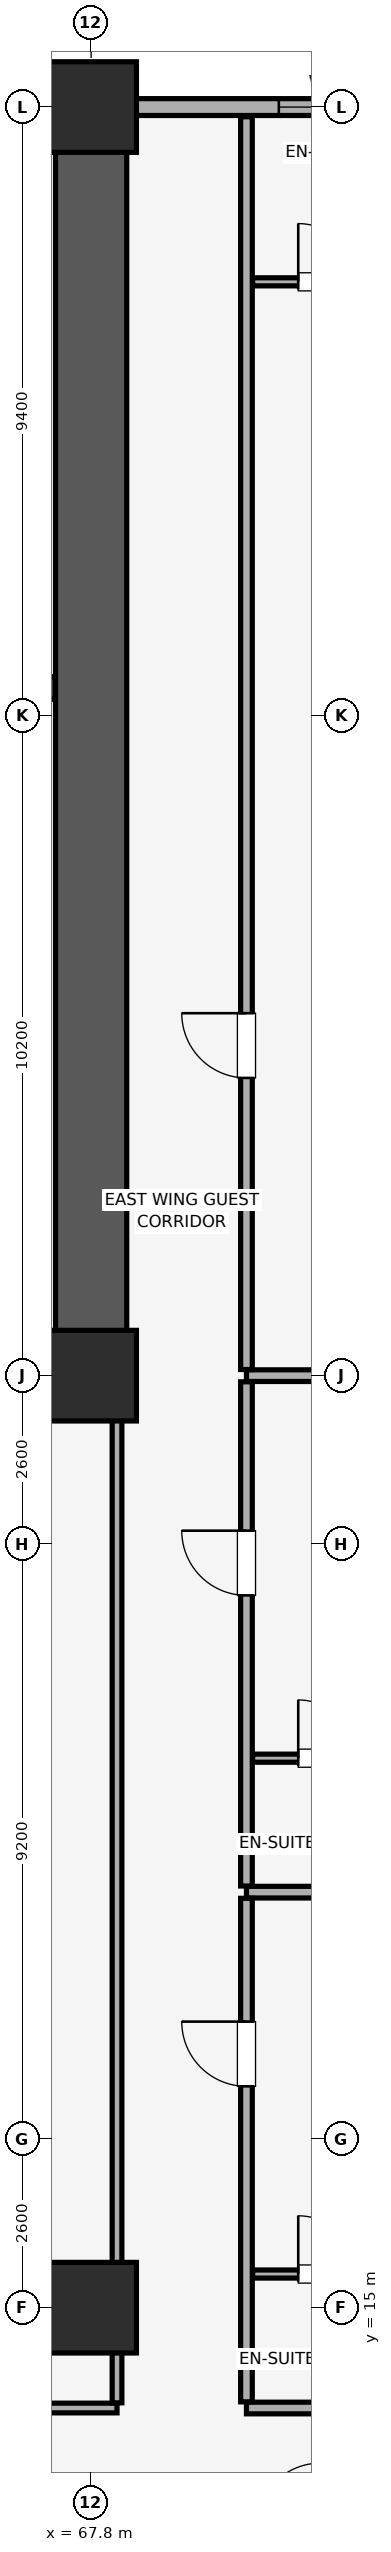
"""IFC4 building model, lengths in metres.
Left out: names, types, materials, properties, quantities, classifications, styles, units other than length and angle.
Written with IfcOpenShell. Run it as: python <this file> out.ifc"""

import sys

from ifc_helpers import new_model, si_unit, direction, frame, frame_2d, origin, origin_2d, place, context, subcontext, project, spatial, rectangle, extrude, element, fill, save


model = new_model("IFC4")
c1 = context("Model", 3, precision=1e-05, world=origin(), true_north=direction((0.0, 1.0)))
c2 = subcontext(c1, "Body", "Model", "MODEL_VIEW")
j1 = project(units=[si_unit("LENGTHUNIT", "METRE"), si_unit("PLANEANGLEUNIT", "RADIAN")], contexts=[c1])
p1 = place(None, origin())
s1 = spatial("IfcSite", under=j1, at=p1, CompositionType="ELEMENT")
p2 = place(p1, origin())
s2 = spatial("IfcBuilding", under=s1, at=p2, CompositionType="ELEMENT")
p3 = place(p2, frame((0.0, 0.0, 57.65)))
s3 = spatial("IfcBuildingStorey", under=s2, at=p3, CompositionType="ELEMENT", Elevation=57.65)
for number, where, z_axis, x_axis in (
    (1, (67.8, 15.0, 0.0), (0.0, 0.0, 1.0), (1.0, 0.0, 0.0)),
    (2, (67.8, 29.4, 0.0), (0.0, 0.0, 1.0), (1.0, 0.0, 0.0)),
    (3, (67.8, 49.0, 0.0), (0.0, 0.0, 1.0), (1.0, 0.0, 0.0)),
):
    element("IfcColumn", number, at=place(p3, frame(where, z_axis=z_axis, x_axis=x_axis)), inside=s3, PredefinedType="COLUMN", context=c2, shape_type="SweptSolid", body=[
        extrude(rectangle(XDim=1.4, YDim=1.4, at=origin_2d()), origin(), (0.0, 0.0, 1.0), 3.51),
    ])
p4 = place(p3, frame((79.8, 49.0, 0.0), z_axis=(0.0, 0.0, 1.0), x_axis=(-1.0, 0.0, 0.0)))
e4 = element("IfcWall", 4, at=p4, inside=s3, PredefinedType="SOLIDWALL", context=c2, shape_type="SweptSolid", body=[
    extrude(rectangle(XDim=75.6, YDim=0.26, at=frame_2d((37.8, 0.0))), origin(), (0.0, 0.0, 1.0), 2.56),
])
p5 = place(p4, frame((72.565, 0.0, 0.85)))
e5 = element("IfcOpeningElement", 5, at=p5, cuts=e4, PredefinedType="OPENING", context=c2, shape_type="SweptSolid", body=[
    extrude(rectangle(XDim=1.5, YDim=1.4, at=frame_2d((0.75, 0.7))), frame((0.0, 0.14, 0.0), z_axis=(0.0, -1.0, 0.0), x_axis=(1.0, 0.0, 0.0)), (0.0, 0.0, 1.0), 0.28),
])
p6 = place(p4, frame((67.45, 0.0, 0.85)))
e6 = element("IfcOpeningElement", 6, at=p6, cuts=e4, PredefinedType="OPENING", context=c2, shape_type="SweptSolid", body=[
    extrude(rectangle(XDim=1.5, YDim=1.4, at=frame_2d((0.75, 0.7))), frame((0.0, 0.14, 0.0), z_axis=(0.0, -1.0, 0.0), x_axis=(1.0, 0.0, 0.0)), (0.0, 0.0, 1.0), 0.28),
])
p7 = place(p4, frame((7.6, 0.0, 0.85)))
e7 = element("IfcOpeningElement", 7, at=p7, cuts=e4, PredefinedType="OPENING", context=c2, shape_type="SweptSolid", body=[
    extrude(rectangle(XDim=1.5, YDim=1.4, at=frame_2d((0.75, 0.7))), frame((0.0, 0.14, 0.0), z_axis=(0.0, -1.0, 0.0), x_axis=(1.0, 0.0, 0.0)), (0.0, 0.0, 1.0), 0.28),
])
p8 = place(p4, frame((1.535, 0.0, 0.85)))
e8 = element("IfcOpeningElement", 8, at=p8, cuts=e4, PredefinedType="OPENING", context=c2, shape_type="SweptSolid", body=[
    extrude(rectangle(XDim=1.5, YDim=1.4, at=frame_2d((0.75, 0.7))), frame((0.0, 0.14, 0.0), z_axis=(0.0, -1.0, 0.0), x_axis=(1.0, 0.0, 0.0)), (0.0, 0.0, 1.0), 0.28),
])
p9 = place(p4, frame((52.265, 0.0, 0.9)))
e9 = element("IfcOpeningElement", 9, at=p9, cuts=e4, PredefinedType="OPENING", context=c2, shape_type="SweptSolid", body=[
    extrude(rectangle(XDim=1.5, YDim=1.4, at=frame_2d((0.75, 0.7))), frame((0.0, 0.14, 0.0), z_axis=(0.0, -1.0, 0.0), x_axis=(1.0, 0.0, 0.0)), (0.0, 0.0, 1.0), 0.28),
])
p10 = place(p4, frame((45.5, 0.0, 0.9)))
e10 = element("IfcOpeningElement", 10, at=p10, cuts=e4, PredefinedType="OPENING", context=c2, shape_type="SweptSolid", body=[
    extrude(rectangle(XDim=1.5, YDim=1.4, at=frame_2d((0.75, 0.7))), frame((0.0, 0.14, 0.0), z_axis=(0.0, -1.0, 0.0), x_axis=(1.0, 0.0, 0.0)), (0.0, 0.0, 1.0), 0.28),
])
p11 = place(p4, frame((31.05, 0.0, 0.9)))
e11 = element("IfcOpeningElement", 11, at=p11, cuts=e4, PredefinedType="OPENING", context=c2, shape_type="SweptSolid", body=[
    extrude(rectangle(XDim=1.5, YDim=1.4, at=frame_2d((0.75, 0.7))), frame((0.0, 0.14, 0.0), z_axis=(0.0, -1.0, 0.0), x_axis=(1.0, 0.0, 0.0)), (0.0, 0.0, 1.0), 0.28),
])
p12 = place(p4, frame((27.85, 0.0, 0.9)))
e12 = element("IfcOpeningElement", 12, at=p12, cuts=e4, PredefinedType="OPENING", context=c2, shape_type="SweptSolid", body=[
    extrude(rectangle(XDim=1.5, YDim=1.4, at=frame_2d((0.75, 0.7))), frame((0.0, 0.14, 0.0), z_axis=(0.0, -1.0, 0.0), x_axis=(1.0, 0.0, 0.0)), (0.0, 0.0, 1.0), 0.28),
])
p13 = place(p4, frame((23.485, 0.0, 0.9)))
e13 = element("IfcOpeningElement", 13, at=p13, cuts=e4, PredefinedType="OPENING", context=c2, shape_type="SweptSolid", body=[
    extrude(rectangle(XDim=1.5, YDim=1.4, at=frame_2d((0.75, 0.7))), frame((0.0, 0.14, 0.0), z_axis=(0.0, -1.0, 0.0), x_axis=(1.0, 0.0, 0.0)), (0.0, 0.0, 1.0), 0.28),
])
p14 = place(p3, frame((67.8, 29.4, 0.0), z_axis=(0.0, 0.0, 1.0), x_axis=(0.0, 1.0, 0.0)))
e14 = element("IfcWall", 14, at=p14, inside=s3, PredefinedType="SHEAR", context=c2, shape_type="SweptSolid", body=[
    extrude(rectangle(XDim=19.2, YDim=1.1, at=frame_2d((9.6, 0.0))), origin(), (0.0, 0.0, 1.0), 3.51),
])
p15 = place(p3, frame((60.4, 29.4, 0.0), z_axis=(0.0, 0.0, 1.0), x_axis=(1.0, 0.0, 0.0)))
e15 = element("IfcWall", 15, at=p15, inside=s3, PredefinedType="SHEAR", context=c2, shape_type="SweptSolid", body=[
    extrude(rectangle(XDim=6.845, YDim=1.1, at=frame_2d((3.423, 0.0))), origin(), (0.0, 0.0, 1.0), 3.51),
])
p16 = place(p3, frame((63.145, 40.025, 0.0), z_axis=(0.0, 0.0, 1.0), x_axis=(1.0, 0.0, 0.0)))
e16 = element("IfcWall", 16, at=p16, inside=s3, PredefinedType="SHEAR", context=c2, shape_type="SweptSolid", body=[
    extrude(rectangle(XDim=4.1, YDim=0.35, at=frame_2d((2.05, 0.0))), origin(), (0.0, 0.0, 1.0), 3.51),
])
p17 = place(p16, frame((1.24, 0.0, 0.0)))
e17 = element("IfcOpeningElement", 17, at=p17, cuts=e16, PredefinedType="OPENING", context=c2, shape_type="SweptSolid", body=[
    extrude(rectangle(XDim=1.15, YDim=2.15, at=frame_2d((0.575, 1.075))), frame((0.0, 0.185, 0.0), z_axis=(0.0, -1.0, 0.0), x_axis=(1.0, 0.0, 0.0)), (0.0, 0.0, 1.0), 0.37),
])
p18 = place(p3, frame((57.88, 13.45, 0.0), z_axis=(0.0, 0.0, 1.0), x_axis=(1.0, 0.0, 0.0)))
e18 = element("IfcWall", 18, at=p18, inside=s3, PredefinedType="PARTITIONING", context=c2, shape_type="SweptSolid", body=[
    extrude(rectangle(XDim=10.32, YDim=0.15, at=frame_2d((5.16, 0.0))), origin(), (0.0, 0.0, 1.0), 3.51),
])
p19 = place(p18, frame((4.62, 0.0, 0.0)))
e19 = element("IfcOpeningElement", 19, at=p19, cuts=e18, PredefinedType="OPENING", context=c2, shape_type="SweptSolid", body=[
    extrude(rectangle(XDim=1.0, YDim=2.15, at=frame_2d((0.5, 1.075))), frame((0.0, 0.085, 0.0), z_axis=(0.0, -1.0, 0.0), x_axis=(1.0, 0.0, 0.0)), (0.0, 0.0, 1.0), 0.17),
])
p20 = place(p3, frame((68.2, 13.53, 0.0), z_axis=(0.0, 0.0, 1.0), x_axis=(0.0, 1.0, 0.0)))
e20 = element("IfcWall", 20, at=p20, inside=s3, PredefinedType="PARTITIONING", context=c2, shape_type="SweptSolid", body=[
    extrude(rectangle(XDim=15.86, YDim=0.15, at=frame_2d((7.93, 0.0))), origin(), (0.0, 0.0, 1.0), 3.51),
])
for number, where, z_axis, x_axis in (
    (21, (70.2, 13.45, 0.0), (0.0, 0.0, 1.0), (1.0, 0.0, 0.0)),
    (22, (70.2, 21.42, 0.0), (0.0, 0.0, 1.0), (1.0, 0.0, 0.0)),
):
    element("IfcWall", number, at=place(p3, frame(where, z_axis=z_axis, x_axis=x_axis)), inside=s3, PredefinedType="PARTITIONING", context=c2, shape_type="SweptSolid", body=[
        extrude(rectangle(XDim=13.65, YDim=0.18, at=frame_2d((6.825, 0.0))), origin(), (0.0, 0.0, 1.0), 3.51),
    ])
p21 = place(p3, frame((70.2, 13.545, 0.0), z_axis=(0.0, 0.0, 1.0), x_axis=(0.0, 1.0, 0.0)))
e23 = element("IfcWall", 23, at=p21, inside=s3, PredefinedType="PARTITIONING", context=c2, shape_type="SweptSolid", body=[
    extrude(rectangle(XDim=7.78, YDim=0.18, at=frame_2d((3.89, 0.0))), origin(), (0.0, 0.0, 1.0), 3.51),
])
p22 = place(p21, frame((4.875, 0.0, 0.0)))
e24 = element("IfcOpeningElement", 24, at=p22, cuts=e23, PredefinedType="OPENING", context=c2, shape_type="SweptSolid", body=[
    extrude(rectangle(XDim=1.0, YDim=2.15, at=frame_2d((0.5, 1.075))), frame((0.0, 0.1, 0.0), z_axis=(0.0, -1.0, 0.0), x_axis=(1.0, 0.0, 0.0)), (0.0, 0.0, 1.0), 0.2),
])
p23 = place(p3, frame((70.295, 15.52, 0.0), z_axis=(0.0, 0.0, 1.0), x_axis=(1.0, 0.0, 0.0)))
e25 = element("IfcWall", 25, at=p23, inside=s3, PredefinedType="PARTITIONING", context=c2, shape_type="SweptSolid", body=[
    extrude(rectangle(XDim=2.405, YDim=0.125, at=frame_2d((1.203, 0.0))), origin(), (0.0, 0.0, 1.0), 3.51),
])
p24 = place(p23, frame((0.705, 0.0, 0.0)))
e26 = element("IfcOpeningElement", 26, at=p24, cuts=e25, PredefinedType="OPENING", context=c2, shape_type="SweptSolid", body=[
    extrude(rectangle(XDim=0.9, YDim=2.1, at=frame_2d((0.45, 1.05))), frame((0.0, 0.073, 0.0), z_axis=(0.0, -1.0, 0.0), x_axis=(1.0, 0.0, 0.0)), (0.0, 0.0, 1.0), 0.145),
])
p25 = place(p3, frame((70.2, 29.4, 0.0), z_axis=(0.0, 0.0, 1.0), x_axis=(1.0, 0.0, 0.0)))
e27 = element("IfcWall", 27, at=p25, inside=s3, PredefinedType="PARTITIONING", context=c2, shape_type="SweptSolid", body=[
    extrude(rectangle(XDim=13.65, YDim=0.18, at=frame_2d((6.825, 0.0))), origin(), (0.0, 0.0, 1.0), 2.86),
])
p26 = place(p3, frame((70.2, 21.515, 0.0), z_axis=(0.0, 0.0, 1.0), x_axis=(0.0, 1.0, 0.0)))
e28 = element("IfcWall", 28, at=p26, inside=s3, PredefinedType="PARTITIONING", context=c2, shape_type="SweptSolid", body=[
    extrude(rectangle(XDim=7.79, YDim=0.18, at=frame_2d((3.895, 0.0))), origin(), (0.0, 0.0, 1.0), 3.51),
])
p27 = place(p26, frame((4.49, 0.0, 0.0)))
e29 = element("IfcOpeningElement", 29, at=p27, cuts=e28, PredefinedType="OPENING", context=c2, shape_type="SweptSolid", body=[
    extrude(rectangle(XDim=1.0, YDim=2.15, at=frame_2d((0.5, 1.075))), frame((0.0, 0.1, 0.0), z_axis=(0.0, -1.0, 0.0), x_axis=(1.0, 0.0, 0.0)), (0.0, 0.0, 1.0), 0.2),
])
p28 = place(p3, frame((70.295, 23.49, 0.0), z_axis=(0.0, 0.0, 1.0), x_axis=(1.0, 0.0, 0.0)))
e30 = element("IfcWall", 30, at=p28, inside=s3, PredefinedType="PARTITIONING", context=c2, shape_type="SweptSolid", body=[
    extrude(rectangle(XDim=2.405, YDim=0.125, at=frame_2d((1.203, 0.0))), origin(), (0.0, 0.0, 1.0), 3.51),
])
p29 = place(p28, frame((0.705, 0.0, 0.0)))
e31 = element("IfcOpeningElement", 31, at=p29, cuts=e30, PredefinedType="OPENING", context=c2, shape_type="SweptSolid", body=[
    extrude(rectangle(XDim=0.9, YDim=2.1, at=frame_2d((0.45, 1.05))), frame((0.0, 0.073, 0.0), z_axis=(0.0, -1.0, 0.0), x_axis=(1.0, 0.0, 0.0)), (0.0, 0.0, 1.0), 0.145),
])
p30 = place(p3, frame((70.2, 29.495, 0.0), z_axis=(0.0, 0.0, 1.0), x_axis=(0.0, 1.0, 0.0)))
e32 = element("IfcWall", 32, at=p30, inside=s3, PredefinedType="PARTITIONING", context=c2, shape_type="SweptSolid", body=[
    extrude(rectangle(XDim=19.355, YDim=0.18, at=frame_2d((9.677, 0.0))), origin(), (0.0, 0.0, 1.0), 3.51),
])
p31 = place(p30, frame((4.505, 0.0, 0.0)))
e33 = element("IfcOpeningElement", 33, at=p31, cuts=e32, PredefinedType="OPENING", context=c2, shape_type="SweptSolid", body=[
    extrude(rectangle(XDim=1.0, YDim=2.15, at=frame_2d((0.5, 1.075))), frame((0.0, 0.1, 0.0), z_axis=(0.0, -1.0, 0.0), x_axis=(1.0, 0.0, 0.0)), (0.0, 0.0, 1.0), 0.2),
])
p32 = place(p3, frame((70.295, 46.3, 0.0), z_axis=(0.0, 0.0, 1.0), x_axis=(1.0, 0.0, 0.0)))
e34 = element("IfcWall", 34, at=p32, inside=s3, PredefinedType="PARTITIONING", context=c2, shape_type="SweptSolid", body=[
    extrude(rectangle(XDim=2.405, YDim=0.125, at=frame_2d((1.203, 0.0))), origin(), (0.0, 0.0, 1.0), 3.51),
])
p33 = place(p32, frame((0.705, 0.0, 0.0)))
e35 = element("IfcOpeningElement", 35, at=p33, cuts=e34, PredefinedType="OPENING", context=c2, shape_type="SweptSolid", body=[
    extrude(rectangle(XDim=0.9, YDim=2.1, at=frame_2d((0.45, 1.05))), frame((0.0, 0.073, 0.0), z_axis=(0.0, -1.0, 0.0), x_axis=(1.0, 0.0, 0.0)), (0.0, 0.0, 1.0), 0.145),
])
p34 = place(p7, origin())
e36 = element("IfcWindow", 36, at=p34, inside=s3, PartitioningType="SINGLE_PANEL", PredefinedType="WINDOW", context=c2, shape_type="SweptSolid", body=[
    extrude(rectangle(XDim=1.5, YDim=1.4, at=frame_2d((0.75, 0.7))), frame((0.0, 0.03, 0.0), z_axis=(0.0, -1.0, 0.0), x_axis=(1.0, 0.0, 0.0)), (0.0, 0.0, 1.0), 0.06),
])
fill(e7, e36)
p35 = place(p22, origin())
e37 = element("IfcDoor", 37, at=p35, inside=s3, OperationType="SINGLE_SWING_RIGHT", PredefinedType="DOOR", context=c2, shape_type="SweptSolid", body=[
    extrude(rectangle(XDim=1.0, YDim=2.15, at=frame_2d((0.5, 1.075))), frame((0.0, 0.025, 0.0), z_axis=(0.0, -1.0, 0.0), x_axis=(1.0, 0.0, 0.0)), (0.0, 0.0, 1.0), 0.05),
])
fill(e24, e37)
p36 = place(p24, origin())
e38 = element("IfcDoor", 38, at=p36, inside=s3, OperationType="SINGLE_SWING_LEFT", PredefinedType="DOOR", context=c2, shape_type="SweptSolid", body=[
    extrude(rectangle(XDim=0.9, YDim=2.1, at=frame_2d((0.45, 1.05))), frame((0.0, 0.025, 0.0), z_axis=(0.0, -1.0, 0.0), x_axis=(1.0, 0.0, 0.0)), (0.0, 0.0, 1.0), 0.05),
])
fill(e26, e38)
p37 = place(p27, origin())
e39 = element("IfcDoor", 39, at=p37, inside=s3, OperationType="SINGLE_SWING_RIGHT", PredefinedType="DOOR", context=c2, shape_type="SweptSolid", body=[
    extrude(rectangle(XDim=1.0, YDim=2.15, at=frame_2d((0.5, 1.075))), frame((0.0, 0.025, 0.0), z_axis=(0.0, -1.0, 0.0), x_axis=(1.0, 0.0, 0.0)), (0.0, 0.0, 1.0), 0.05),
])
fill(e29, e39)
p38 = place(p29, origin())
e40 = element("IfcDoor", 40, at=p38, inside=s3, OperationType="SINGLE_SWING_LEFT", PredefinedType="DOOR", context=c2, shape_type="SweptSolid", body=[
    extrude(rectangle(XDim=0.9, YDim=2.1, at=frame_2d((0.45, 1.05))), frame((0.0, 0.025, 0.0), z_axis=(0.0, -1.0, 0.0), x_axis=(1.0, 0.0, 0.0)), (0.0, 0.0, 1.0), 0.05),
])
fill(e31, e40)
p39 = place(p31, origin())
e41 = element("IfcDoor", 41, at=p39, inside=s3, OperationType="SINGLE_SWING_RIGHT", PredefinedType="DOOR", context=c2, shape_type="SweptSolid", body=[
    extrude(rectangle(XDim=1.0, YDim=2.15, at=frame_2d((0.5, 1.075))), frame((0.0, 0.025, 0.0), z_axis=(0.0, -1.0, 0.0), x_axis=(1.0, 0.0, 0.0)), (0.0, 0.0, 1.0), 0.05),
])
fill(e33, e41)
p40 = place(p33, origin())
e42 = element("IfcDoor", 42, at=p40, inside=s3, OperationType="SINGLE_SWING_LEFT", PredefinedType="DOOR", context=c2, shape_type="SweptSolid", body=[
    extrude(rectangle(XDim=0.9, YDim=2.1, at=frame_2d((0.45, 1.05))), frame((0.0, 0.025, 0.0), z_axis=(0.0, -1.0, 0.0), x_axis=(1.0, 0.0, 0.0)), (0.0, 0.0, 1.0), 0.05),
])
fill(e35, e42)
save(model, sys.argv[1])
